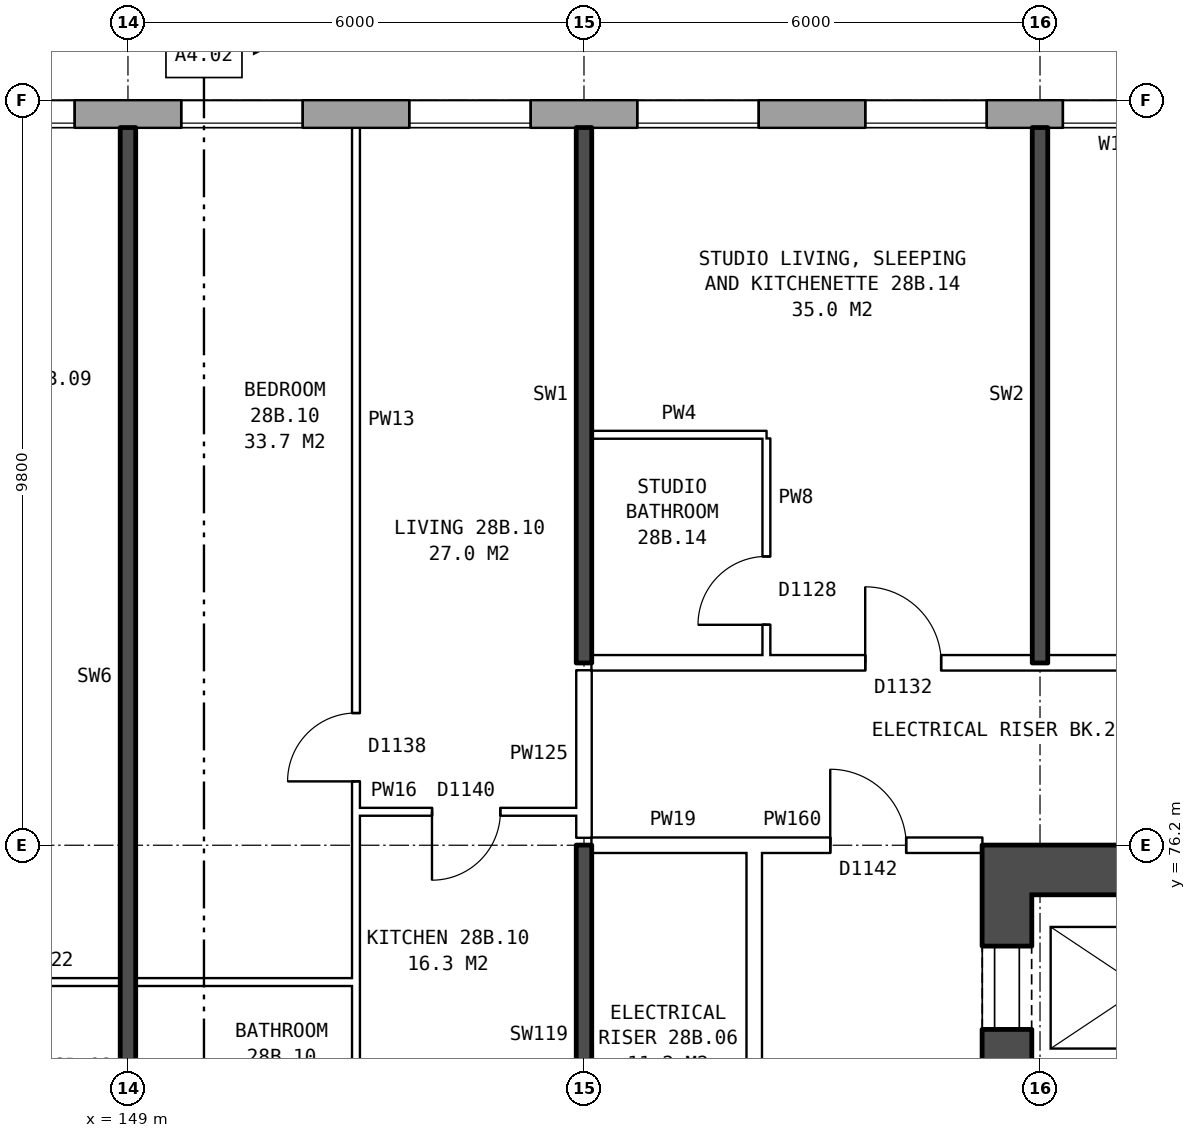
"""IFC4 building model, lengths in metres.
Left out: names, types, materials, properties, quantities, classifications, styles, units other than length and angle.
Written with IfcOpenShell. Run it as: python <this file> out.ifc"""

import sys

from ifc_helpers import new_model, si_unit, direction, frame, frame_2d, origin, place, context, subcontext, project, spatial, rectangle, extrude, element, fill, save


model = new_model("IFC4")
c1 = context("Model", 3, precision=1e-05, world=origin(), true_north=direction((0.0, 1.0)))
c2 = subcontext(c1, "Body", "Model", "MODEL_VIEW")
j1 = project(units=[si_unit("LENGTHUNIT", "METRE"), si_unit("PLANEANGLEUNIT", "RADIAN")], contexts=[c1])
p1 = place(None, origin())
s1 = spatial("IfcSite", under=j1, at=p1, CompositionType="ELEMENT")
p2 = place(p1, origin())
s2 = spatial("IfcBuilding", under=s1, at=p2, CompositionType="ELEMENT")
p3 = place(p2, frame((0.0, 0.0, 102.6)))
s3 = spatial("IfcBuildingStorey", under=s2, at=p3, CompositionType="ELEMENT", Elevation=102.6)
p4 = place(p3, frame((170.925, 85.82, 0.0), z_axis=(0.0, 0.0, 1.0), x_axis=(-1.0, 0.0, 0.0)))
e1 = element("IfcWall", 1, at=p4, inside=s3, PredefinedType="STANDARD", context=c2, shape_type="SweptSolid", body=[
    extrude(rectangle(XDim=36.851, YDim=0.36, at=frame_2d((18.425, 0.0))), origin(), (0.0, 0.0, 1.0), 2.85),
])
p5 = place(p4, frame((1.625, 0.0, 0.8)))
e2 = element("IfcOpeningElement", 2, at=p5, cuts=e1, PredefinedType="OPENING", context=c2, shape_type="SweptSolid", body=[
    extrude(rectangle(XDim=1.6, YDim=1.8, at=frame_2d((0.8, 0.9))), frame((0.0, 0.19, 0.0), z_axis=(0.0, -1.0, 0.0), x_axis=(1.0, 0.0, 0.0)), (0.0, 0.0, 1.0), 0.38),
])
p6 = place(p4, frame((4.125, 0.0, 0.8)))
e3 = element("IfcOpeningElement", 3, at=p6, cuts=e1, PredefinedType="OPENING", context=c2, shape_type="SweptSolid", body=[
    extrude(rectangle(XDim=0.8, YDim=1.8, at=frame_2d((0.4, 0.9))), frame((0.0, 0.19, 0.0), z_axis=(0.0, -1.0, 0.0), x_axis=(1.0, 0.0, 0.0)), (0.0, 0.0, 1.0), 0.38),
])
p7 = place(p4, frame((5.225, 0.0, 1.7)))
e4 = element("IfcOpeningElement", 4, at=p7, cuts=e1, PredefinedType="OPENING", context=c2, shape_type="SweptSolid", body=[
    extrude(rectangle(XDim=0.8, YDim=0.9, at=frame_2d((0.4, 0.45))), frame((0.0, 0.19, 0.0), z_axis=(0.0, -1.0, 0.0), x_axis=(1.0, 0.0, 0.0)), (0.0, 0.0, 1.0), 0.38),
])
p8 = place(p4, frame((10.625, 0.0, 0.8)))
e5 = element("IfcOpeningElement", 5, at=p8, cuts=e1, PredefinedType="OPENING", context=c2, shape_type="SweptSolid", body=[
    extrude(rectangle(XDim=1.6, YDim=1.8, at=frame_2d((0.8, 0.9))), frame((0.0, 0.19, 0.0), z_axis=(0.0, -1.0, 0.0), x_axis=(1.0, 0.0, 0.0)), (0.0, 0.0, 1.0), 0.38),
])
p9 = place(p4, frame((13.625, 0.0, 0.8)))
e6 = element("IfcOpeningElement", 6, at=p9, cuts=e1, PredefinedType="OPENING", context=c2, shape_type="SweptSolid", body=[
    extrude(rectangle(XDim=1.6, YDim=1.8, at=frame_2d((0.8, 0.9))), frame((0.0, 0.19, 0.0), z_axis=(0.0, -1.0, 0.0), x_axis=(1.0, 0.0, 0.0)), (0.0, 0.0, 1.0), 0.38),
])
p10 = place(p4, frame((16.625, 0.0, 0.8)))
e7 = element("IfcOpeningElement", 7, at=p10, cuts=e1, PredefinedType="OPENING", context=c2, shape_type="SweptSolid", body=[
    extrude(rectangle(XDim=1.6, YDim=1.8, at=frame_2d((0.8, 0.9))), frame((0.0, 0.19, 0.0), z_axis=(0.0, -1.0, 0.0), x_axis=(1.0, 0.0, 0.0)), (0.0, 0.0, 1.0), 0.38),
])
p11 = place(p4, frame((19.625, 0.0, 0.8)))
e8 = element("IfcOpeningElement", 8, at=p11, cuts=e1, PredefinedType="OPENING", context=c2, shape_type="SweptSolid", body=[
    extrude(rectangle(XDim=1.6, YDim=1.8, at=frame_2d((0.8, 0.9))), frame((0.0, 0.19, 0.0), z_axis=(0.0, -1.0, 0.0), x_axis=(1.0, 0.0, 0.0)), (0.0, 0.0, 1.0), 0.38),
])
p12 = place(p4, frame((22.625, 0.0, 0.8)))
e9 = element("IfcOpeningElement", 9, at=p12, cuts=e1, PredefinedType="OPENING", context=c2, shape_type="SweptSolid", body=[
    extrude(rectangle(XDim=1.6, YDim=1.8, at=frame_2d((0.8, 0.9))), frame((0.0, 0.19, 0.0), z_axis=(0.0, -1.0, 0.0), x_axis=(1.0, 0.0, 0.0)), (0.0, 0.0, 1.0), 0.38),
])
p13 = place(p4, frame((25.625, 0.0, 0.8)))
e10 = element("IfcOpeningElement", 10, at=p13, cuts=e1, PredefinedType="OPENING", context=c2, shape_type="SweptSolid", body=[
    extrude(rectangle(XDim=1.6, YDim=1.8, at=frame_2d((0.8, 0.9))), frame((0.0, 0.19, 0.0), z_axis=(0.0, -1.0, 0.0), x_axis=(1.0, 0.0, 0.0)), (0.0, 0.0, 1.0), 0.38),
])
p14 = place(p4, frame((28.125, 0.0, 0.8)))
e11 = element("IfcOpeningElement", 11, at=p14, cuts=e1, PredefinedType="OPENING", context=c2, shape_type="SweptSolid", body=[
    extrude(rectangle(XDim=1.2, YDim=1.2, at=frame_2d((0.6, 0.6))), frame((0.0, 0.19, 0.0), z_axis=(0.0, -1.0, 0.0), x_axis=(1.0, 0.0, 0.0)), (0.0, 0.0, 1.0), 0.38),
])
p15 = place(p4, frame((31.625, 0.0, 0.8)))
e12 = element("IfcOpeningElement", 12, at=p15, cuts=e1, PredefinedType="OPENING", context=c2, shape_type="SweptSolid", body=[
    extrude(rectangle(XDim=1.6, YDim=1.8, at=frame_2d((0.8, 0.9))), frame((0.0, 0.19, 0.0), z_axis=(0.0, -1.0, 0.0), x_axis=(1.0, 0.0, 0.0)), (0.0, 0.0, 1.0), 0.38),
])
p16 = place(p4, frame((34.625, 0.0, 0.8)))
e13 = element("IfcOpeningElement", 13, at=p16, cuts=e1, PredefinedType="OPENING", context=c2, shape_type="SweptSolid", body=[
    extrude(rectangle(XDim=1.6, YDim=1.8, at=frame_2d((0.8, 0.9))), frame((0.0, 0.19, 0.0), z_axis=(0.0, -1.0, 0.0), x_axis=(1.0, 0.0, 0.0)), (0.0, 0.0, 1.0), 0.38),
])
p17 = place(p4, frame((7.125, 0.0, 0.8)))
e14 = element("IfcOpeningElement", 14, at=p17, cuts=e1, PredefinedType="OPENING", context=c2, shape_type="SweptSolid", body=[
    extrude(rectangle(XDim=0.8, YDim=0.9, at=frame_2d((0.4, 0.45))), frame((0.0, 0.19, 0.0), z_axis=(0.0, -1.0, 0.0), x_axis=(1.0, 0.0, 0.0)), (0.0, 0.0, 1.0), 0.38),
])
p18 = place(p4, frame((8.225, 0.0, 0.8)))
e15 = element("IfcOpeningElement", 15, at=p18, cuts=e1, PredefinedType="OPENING", context=c2, shape_type="SweptSolid", body=[
    extrude(rectangle(XDim=1.4, YDim=1.8, at=frame_2d((0.7, 0.9))), frame((0.0, 0.19, 0.0), z_axis=(0.0, -1.0, 0.0), x_axis=(1.0, 0.0, 0.0)), (0.0, 0.0, 1.0), 0.38),
])
p19 = place(p3, frame((160.565, 75.55, 0.0), z_axis=(0.0, 0.0, 1.0), x_axis=(0.0, -1.0, 0.0)))
e16 = element("IfcWall", 16, at=p19, inside=s3, PredefinedType="SHEAR", context=c2, shape_type="SweptSolid", body=[
    extrude(rectangle(XDim=11.1, YDim=0.65, at=frame_2d((5.55, 0.0))), origin(), (0.0, 0.0, 1.0), 2.85),
])
p20 = place(p19, frame((0.675, 0.0, 0.0)))
e17 = element("IfcOpeningElement", 17, at=p20, cuts=e16, PredefinedType="OPENING", context=c2, shape_type="SweptSolid", body=[
    extrude(rectangle(XDim=1.1, YDim=2.1, at=frame_2d((0.55, 1.05))), frame((0.0, 0.335, 0.0), z_axis=(0.0, -1.0, 0.0), x_axis=(1.0, 0.0, 0.0)), (0.0, 0.0, 1.0), 0.67),
])
p21 = place(p19, frame((2.95, 0.0, 0.0)))
e18 = element("IfcOpeningElement", 18, at=p21, cuts=e16, PredefinedType="OPENING", context=c2, shape_type="SweptSolid", body=[
    extrude(rectangle(XDim=1.1, YDim=2.1, at=frame_2d((0.55, 1.05))), frame((0.0, 0.335, 0.0), z_axis=(0.0, -1.0, 0.0), x_axis=(1.0, 0.0, 0.0)), (0.0, 0.0, 1.0), 0.67),
])
p22 = place(p19, frame((5.15, 0.0, 0.0)))
e19 = element("IfcOpeningElement", 19, at=p22, cuts=e16, PredefinedType="OPENING", context=c2, shape_type="SweptSolid", body=[
    extrude(rectangle(XDim=1.1, YDim=2.1, at=frame_2d((0.55, 1.05))), frame((0.0, 0.335, 0.0), z_axis=(0.0, -1.0, 0.0), x_axis=(1.0, 0.0, 0.0)), (0.0, 0.0, 1.0), 0.67),
])
p23 = place(p19, frame((9.25, 0.0, 0.0)))
e20 = element("IfcOpeningElement", 20, at=p23, cuts=e16, PredefinedType="OPENING", context=c2, shape_type="SweptSolid", body=[
    extrude(rectangle(XDim=1.1, YDim=2.1, at=frame_2d((0.55, 1.05))), frame((0.0, 0.335, 0.0), z_axis=(0.0, -1.0, 0.0), x_axis=(1.0, 0.0, 0.0)), (0.0, 0.0, 1.0), 0.67),
])
p24 = place(p19, frame((7.475, 0.0, 0.0)))
e21 = element("IfcOpeningElement", 21, at=p24, cuts=e16, PredefinedType="OPENING", context=c2, shape_type="SweptSolid", body=[
    extrude(rectangle(XDim=0.85, YDim=2.1, at=frame_2d((0.425, 1.05))), frame((0.0, 0.335, 0.0), z_axis=(0.0, -1.0, 0.0), x_axis=(1.0, 0.0, 0.0)), (0.0, 0.0, 1.0), 0.67),
])
p25 = place(p3, frame((160.24, 75.875, 0.0), z_axis=(0.0, 0.0, 1.0), x_axis=(1.0, 0.0, 0.0)))
e22 = element("IfcWall", 22, at=p25, inside=s3, PredefinedType="SHEAR", context=c2, shape_type="SweptSolid", body=[
    extrude(rectangle(XDim=8.4, YDim=0.65, at=frame_2d((4.2, 0.0))), origin(), (0.0, 0.0, 1.0), 2.85),
])
p26 = place(p3, frame((157.24, 63.9, 0.0), z_axis=(0.0, 0.0, 1.0), x_axis=(0.0, 1.0, 0.0)))
e23 = element("IfcWall", 23, at=p26, inside=s3, PredefinedType="PARTITIONING", context=c2, shape_type="SweptSolid", body=[
    extrude(rectangle(XDim=12.2, YDim=0.2, at=frame_2d((6.1, 0.0))), origin(), (0.0, 0.0, 1.0), 2.85),
])
p27 = place(p26, frame((5.1, 0.0, 0.0)))
e24 = element("IfcOpeningElement", 24, at=p27, cuts=e23, PredefinedType="OPENING", context=c2, shape_type="SweptSolid", body=[
    extrude(rectangle(XDim=2.0, YDim=2.1, at=frame_2d((1.0, 1.05))), frame((0.0, 0.11, 0.0), z_axis=(0.0, -1.0, 0.0), x_axis=(1.0, 0.0, 0.0)), (0.0, 0.0, 1.0), 0.22),
])
p28 = place(p3, frame((146.0, 74.4, 0.0), z_axis=(0.0, 0.0, 1.0), x_axis=(1.0, 0.0, 0.0)))
e25 = element("IfcWall", 25, at=p28, inside=s3, PredefinedType="PARTITIONING", context=c2, shape_type="SweptSolid", body=[
    extrude(rectangle(XDim=6.0, YDim=0.1, at=frame_2d((3.0, 0.0))), origin(), (0.0, 0.0, 1.0), 2.85),
])
p29 = place(p3, frame((155.1, 76.2, 0.0), z_axis=(0.0, 0.0, 1.0), x_axis=(1.0, 0.0, 0.0)))
e26 = element("IfcWall", 26, at=p29, inside=s3, PredefinedType="PARTITIONING", context=c2, shape_type="SweptSolid", body=[
    extrude(rectangle(XDim=2.14, YDim=0.2, at=frame_2d((1.07, 0.0))), origin(), (0.0, 0.0, 1.0), 2.85),
])
p30 = place(p3, frame((157.24, 76.2, 0.0), z_axis=(0.0, 0.0, 1.0), x_axis=(1.0, 0.0, 0.0)))
e27 = element("IfcWall", 27, at=p30, inside=s3, PredefinedType="PARTITIONING", context=c2, shape_type="SweptSolid", body=[
    extrude(rectangle(XDim=3.0, YDim=0.2, at=frame_2d((1.5, 0.0))), origin(), (0.0, 0.0, 1.0), 2.85),
])
p31 = place(p30, frame((1.0, 0.0, 0.0)))
e28 = element("IfcOpeningElement", 28, at=p31, cuts=e27, PredefinedType="OPENING", context=c2, shape_type="SweptSolid", body=[
    extrude(rectangle(XDim=1.0, YDim=2.1, at=frame_2d((0.5, 1.05))), frame((0.0, 0.11, 0.0), z_axis=(0.0, -1.0, 0.0), x_axis=(1.0, 0.0, 0.0)), (0.0, 0.0, 1.0), 0.22),
])
p32 = place(p3, frame((152.0, 76.64, 0.0), z_axis=(0.0, 0.0, 1.0), x_axis=(1.0, 0.0, 0.0)))
e29 = element("IfcWall", 29, at=p32, inside=s3, PredefinedType="PARTITIONING", context=c2, shape_type="SweptSolid", body=[
    extrude(rectangle(XDim=2.9, YDim=0.1, at=frame_2d((1.45, 0.0))), origin(), (0.0, 0.0, 1.0), 2.85),
])
p33 = place(p32, frame((1.0, 0.0, 0.0)))
e30 = element("IfcOpeningElement", 30, at=p33, cuts=e29, PredefinedType="OPENING", context=c2, shape_type="SweptSolid", body=[
    extrude(rectangle(XDim=0.9, YDim=2.1, at=frame_2d((0.45, 1.05))), frame((0.0, 0.06, 0.0), z_axis=(0.0, -1.0, 0.0), x_axis=(1.0, 0.0, 0.0)), (0.0, 0.0, 1.0), 0.12),
])
p34 = place(p3, frame((155.1, 78.6, 0.0), z_axis=(0.0, 0.0, 1.0), x_axis=(1.0, 0.0, 0.0)))
e31 = element("IfcWall", 31, at=p34, inside=s3, PredefinedType="PARTITIONING", context=c2, shape_type="SweptSolid", body=[
    extrude(rectangle(XDim=18.54, YDim=0.2, at=frame_2d((9.27, 0.0))), origin(), (0.0, 0.0, 1.0), 2.85),
])
p35 = place(p34, frame((3.6, 0.0, 0.0)))
e32 = element("IfcOpeningElement", 32, at=p35, cuts=e31, PredefinedType="OPENING", context=c2, shape_type="SweptSolid", body=[
    extrude(rectangle(XDim=1.0, YDim=2.1, at=frame_2d((0.5, 1.05))), frame((0.0, 0.11, 0.0), z_axis=(0.0, -1.0, 0.0), x_axis=(1.0, 0.0, 0.0)), (0.0, 0.0, 1.0), 0.22),
])
p36 = place(p34, frame((7.4, 0.0, 0.0)))
e33 = element("IfcOpeningElement", 33, at=p36, cuts=e31, PredefinedType="OPENING", context=c2, shape_type="SweptSolid", body=[
    extrude(rectangle(XDim=1.0, YDim=2.1, at=frame_2d((0.5, 1.05))), frame((0.0, 0.11, 0.0), z_axis=(0.0, -1.0, 0.0), x_axis=(1.0, 0.0, 0.0)), (0.0, 0.0, 1.0), 0.22),
])
p37 = place(p34, frame((15.92, 0.0, 0.0)))
e34 = element("IfcOpeningElement", 34, at=p37, cuts=e31, PredefinedType="OPENING", context=c2, shape_type="SweptSolid", body=[
    extrude(rectangle(XDim=1.0, YDim=2.1, at=frame_2d((0.5, 1.05))), frame((0.0, 0.11, 0.0), z_axis=(0.0, -1.0, 0.0), x_axis=(1.0, 0.0, 0.0)), (0.0, 0.0, 1.0), 0.22),
])
p38 = place(p3, frame((155.1, 81.6, 0.0), z_axis=(0.0, 0.0, 1.0), x_axis=(1.0, 0.0, 0.0)))
e35 = element("IfcWall", 35, at=p38, inside=s3, PredefinedType="PARTITIONING", context=c2, shape_type="SweptSolid", body=[
    extrude(rectangle(XDim=2.3, YDim=0.1, at=frame_2d((1.15, 0.0))), origin(), (0.0, 0.0, 1.0), 2.85),
])
p39 = place(p3, frame((149.0, 71.2, 0.0), z_axis=(0.0, 0.0, 1.0), x_axis=(0.0, 1.0, 0.0)))
e36 = element("IfcWall", 36, at=p39, inside=s3, PredefinedType="SOLIDWALL", context=c2, shape_type="SweptSolid", body=[
    extrude(rectangle(XDim=14.44, YDim=0.2, at=frame_2d((7.22, 0.0))), origin(), (0.0, 0.0, 1.0), 2.85),
])
p40 = place(p3, frame((152.0, 71.3, 0.0), z_axis=(0.0, 0.0, 1.0), x_axis=(0.0, 1.0, 0.0)))
e37 = element("IfcWall", 37, at=p40, inside=s3, PredefinedType="PARTITIONING", context=c2, shape_type="SweptSolid", body=[
    extrude(rectangle(XDim=14.34, YDim=0.1, at=frame_2d((7.17, 0.0))), origin(), (0.0, 0.0, 1.0), 2.85),
])
p41 = place(p40, frame((5.74, 0.0, 0.0)))
e38 = element("IfcOpeningElement", 38, at=p41, cuts=e37, PredefinedType="OPENING", context=c2, shape_type="SweptSolid", body=[
    extrude(rectangle(XDim=0.9, YDim=2.1, at=frame_2d((0.45, 1.05))), frame((0.0, 0.06, 0.0), z_axis=(0.0, -1.0, 0.0), x_axis=(1.0, 0.0, 0.0)), (0.0, 0.0, 1.0), 0.12),
])
p42 = place(p40, frame((0.4, 0.0, 0.0)))
e39 = element("IfcOpeningElement", 39, at=p42, cuts=e37, PredefinedType="OPENING", context=c2, shape_type="SweptSolid", body=[
    extrude(rectangle(XDim=0.9, YDim=2.1, at=frame_2d((0.45, 1.05))), frame((0.0, 0.06, 0.0), z_axis=(0.0, -1.0, 0.0), x_axis=(1.0, 0.0, 0.0)), (0.0, 0.0, 1.0), 0.12),
])
p43 = place(p3, frame((155.0, 71.2, 0.0), z_axis=(0.0, 0.0, 1.0), x_axis=(0.0, 1.0, 0.0)))
e40 = element("IfcWall", 40, at=p43, inside=s3, PredefinedType="SOLIDWALL", context=c2, shape_type="SweptSolid", body=[
    extrude(rectangle(XDim=5.0, YDim=0.2, at=frame_2d((2.5, 0.0))), origin(), (0.0, 0.0, 1.0), 2.85),
])
p44 = place(p3, frame((155.0, 76.3, 0.0), z_axis=(0.0, 0.0, 1.0), x_axis=(0.0, 1.0, 0.0)))
e41 = element("IfcWall", 41, at=p44, inside=s3, PredefinedType="PARTITIONING", context=c2, shape_type="SweptSolid", body=[
    extrude(rectangle(XDim=2.2, YDim=0.2, at=frame_2d((1.1, 0.0))), origin(), (0.0, 0.0, 1.0), 2.85),
])
p45 = place(p3, frame((155.0, 78.6, 0.0), z_axis=(0.0, 0.0, 1.0), x_axis=(0.0, 1.0, 0.0)))
e42 = element("IfcWall", 42, at=p45, inside=s3, PredefinedType="SOLIDWALL", context=c2, shape_type="SweptSolid", body=[
    extrude(rectangle(XDim=7.04, YDim=0.2, at=frame_2d((3.52, 0.0))), origin(), (0.0, 0.0, 1.0), 2.85),
])
p46 = place(p3, frame((157.4, 78.7, 0.0), z_axis=(0.0, 0.0, 1.0), x_axis=(0.0, 1.0, 0.0)))
e43 = element("IfcWall", 43, at=p46, inside=s3, PredefinedType="PARTITIONING", context=c2, shape_type="SweptSolid", body=[
    extrude(rectangle(XDim=2.85, YDim=0.1, at=frame_2d((1.425, 0.0))), origin(), (0.0, 0.0, 1.0), 2.85),
])
p47 = place(p46, frame((0.4, 0.0, 0.0)))
e44 = element("IfcOpeningElement", 44, at=p47, cuts=e43, PredefinedType="OPENING", context=c2, shape_type="SweptSolid", body=[
    extrude(rectangle(XDim=0.9, YDim=2.1, at=frame_2d((0.45, 1.05))), frame((0.0, 0.06, 0.0), z_axis=(0.0, -1.0, 0.0), x_axis=(1.0, 0.0, 0.0)), (0.0, 0.0, 1.0), 0.12),
])
p48 = place(p3, frame((161.0, 78.6, 0.0), z_axis=(0.0, 0.0, 1.0), x_axis=(0.0, 1.0, 0.0)))
e45 = element("IfcWall", 45, at=p48, inside=s3, PredefinedType="SOLIDWALL", context=c2, shape_type="SweptSolid", body=[
    extrude(rectangle(XDim=7.04, YDim=0.2, at=frame_2d((3.52, 0.0))), origin(), (0.0, 0.0, 1.0), 2.85),
])
p49 = place(p8, origin())
e46 = element("IfcWindow", 46, at=p49, inside=s3, PartitioningType="SINGLE_PANEL", PredefinedType="WINDOW", context=c2, shape_type="SweptSolid", body=[
    extrude(rectangle(XDim=1.6, YDim=1.8, at=frame_2d((0.8, 0.9))), frame((0.0, 0.15, 0.0), z_axis=(0.0, -1.0, 0.0), x_axis=(1.0, 0.0, 0.0)), (0.0, 0.0, 1.0), 0.06),
])
fill(e5, e46)
p50 = place(p9, origin())
e47 = element("IfcWindow", 47, at=p50, inside=s3, PartitioningType="SINGLE_PANEL", PredefinedType="WINDOW", context=c2, shape_type="SweptSolid", body=[
    extrude(rectangle(XDim=1.6, YDim=1.8, at=frame_2d((0.8, 0.9))), frame((0.0, 0.15, 0.0), z_axis=(0.0, -1.0, 0.0), x_axis=(1.0, 0.0, 0.0)), (0.0, 0.0, 1.0), 0.06),
])
fill(e6, e47)
p51 = place(p10, origin())
e48 = element("IfcWindow", 48, at=p51, inside=s3, PartitioningType="SINGLE_PANEL", PredefinedType="WINDOW", context=c2, shape_type="SweptSolid", body=[
    extrude(rectangle(XDim=1.6, YDim=1.8, at=frame_2d((0.8, 0.9))), frame((0.0, 0.15, 0.0), z_axis=(0.0, -1.0, 0.0), x_axis=(1.0, 0.0, 0.0)), (0.0, 0.0, 1.0), 0.06),
])
fill(e7, e48)
p52 = place(p11, origin())
e49 = element("IfcWindow", 49, at=p52, inside=s3, PartitioningType="SINGLE_PANEL", PredefinedType="WINDOW", context=c2, shape_type="SweptSolid", body=[
    extrude(rectangle(XDim=1.6, YDim=1.8, at=frame_2d((0.8, 0.9))), frame((0.0, 0.15, 0.0), z_axis=(0.0, -1.0, 0.0), x_axis=(1.0, 0.0, 0.0)), (0.0, 0.0, 1.0), 0.06),
])
fill(e8, e49)
p53 = place(p12, origin())
e50 = element("IfcWindow", 50, at=p53, inside=s3, PartitioningType="SINGLE_PANEL", PredefinedType="WINDOW", context=c2, shape_type="SweptSolid", body=[
    extrude(rectangle(XDim=1.6, YDim=1.8, at=frame_2d((0.8, 0.9))), frame((0.0, 0.15, 0.0), z_axis=(0.0, -1.0, 0.0), x_axis=(1.0, 0.0, 0.0)), (0.0, 0.0, 1.0), 0.06),
])
fill(e9, e50)
p54 = place(p20, origin())
e51 = element("IfcDoor", 51, at=p54, inside=s3, OperationType="DOUBLE_DOOR_SLIDING", PredefinedType="DOOR", context=c2, shape_type="SweptSolid", body=[
    extrude(rectangle(XDim=1.1, YDim=2.1, at=frame_2d((0.55, 1.05))), frame((0.0, 0.31, 0.0), z_axis=(0.0, -1.0, 0.0), x_axis=(1.0, 0.0, 0.0)), (0.0, 0.0, 1.0), 0.05),
])
fill(e17, e51)
p55 = place(p31, origin())
e52 = element("IfcDoor", 52, at=p55, inside=s3, OperationType="SINGLE_SWING_LEFT", PredefinedType="DOOR", context=c2, shape_type="SweptSolid", body=[
    extrude(rectangle(XDim=1.0, YDim=2.1, at=frame_2d((0.5, 1.05))), frame((0.0, 0.025, 0.0), z_axis=(0.0, -1.0, 0.0), x_axis=(1.0, 0.0, 0.0)), (0.0, 0.0, 1.0), 0.05),
])
fill(e28, e52)
p56 = place(p41, origin())
e53 = element("IfcDoor", 53, at=p56, inside=s3, OperationType="SINGLE_SWING_LEFT", PredefinedType="DOOR", context=c2, shape_type="SweptSolid", body=[
    extrude(rectangle(XDim=0.9, YDim=2.1, at=frame_2d((0.45, 1.05))), frame((0.0, 0.025, 0.0), z_axis=(0.0, -1.0, 0.0), x_axis=(1.0, 0.0, 0.0)), (0.0, 0.0, 1.0), 0.05),
])
fill(e38, e53)
p57 = place(p33, frame((0.9, 0.0, 0.0), z_axis=(0.0, 0.0, 1.0), x_axis=(-1.0, 0.0, 0.0)))
e54 = element("IfcDoor", 54, at=p57, inside=s3, OperationType="SINGLE_SWING_RIGHT", PredefinedType="DOOR", context=c2, shape_type="SweptSolid", body=[
    extrude(rectangle(XDim=0.9, YDim=2.1, at=frame_2d((0.45, 1.05))), frame((0.0, 0.025, 0.0), z_axis=(0.0, -1.0, 0.0), x_axis=(1.0, 0.0, 0.0)), (0.0, 0.0, 1.0), 0.05),
])
fill(e30, e54)
p58 = place(p35, origin())
e55 = element("IfcDoor", 55, at=p58, inside=s3, OperationType="SINGLE_SWING_LEFT", PredefinedType="DOOR", context=c2, shape_type="SweptSolid", body=[
    extrude(rectangle(XDim=1.0, YDim=2.1, at=frame_2d((0.5, 1.05))), frame((0.0, 0.025, 0.0), z_axis=(0.0, -1.0, 0.0), x_axis=(1.0, 0.0, 0.0)), (0.0, 0.0, 1.0), 0.05),
])
fill(e32, e55)
p59 = place(p47, origin())
e56 = element("IfcDoor", 56, at=p59, inside=s3, OperationType="SINGLE_SWING_LEFT", PredefinedType="DOOR", context=c2, shape_type="SweptSolid", body=[
    extrude(rectangle(XDim=0.9, YDim=2.1, at=frame_2d((0.45, 1.05))), frame((0.0, 0.025, 0.0), z_axis=(0.0, -1.0, 0.0), x_axis=(1.0, 0.0, 0.0)), (0.0, 0.0, 1.0), 0.05),
])
fill(e44, e56)
p60 = place(p18, origin())
e57 = element("IfcWindow", 57, at=p60, inside=s3, PartitioningType="SINGLE_PANEL", PredefinedType="WINDOW", context=c2, shape_type="SweptSolid", body=[
    extrude(rectangle(XDim=1.4, YDim=1.8, at=frame_2d((0.7, 0.9))), frame((0.0, 0.15, 0.0), z_axis=(0.0, -1.0, 0.0), x_axis=(1.0, 0.0, 0.0)), (0.0, 0.0, 1.0), 0.06),
])
fill(e15, e57)
save(model, sys.argv[1])
